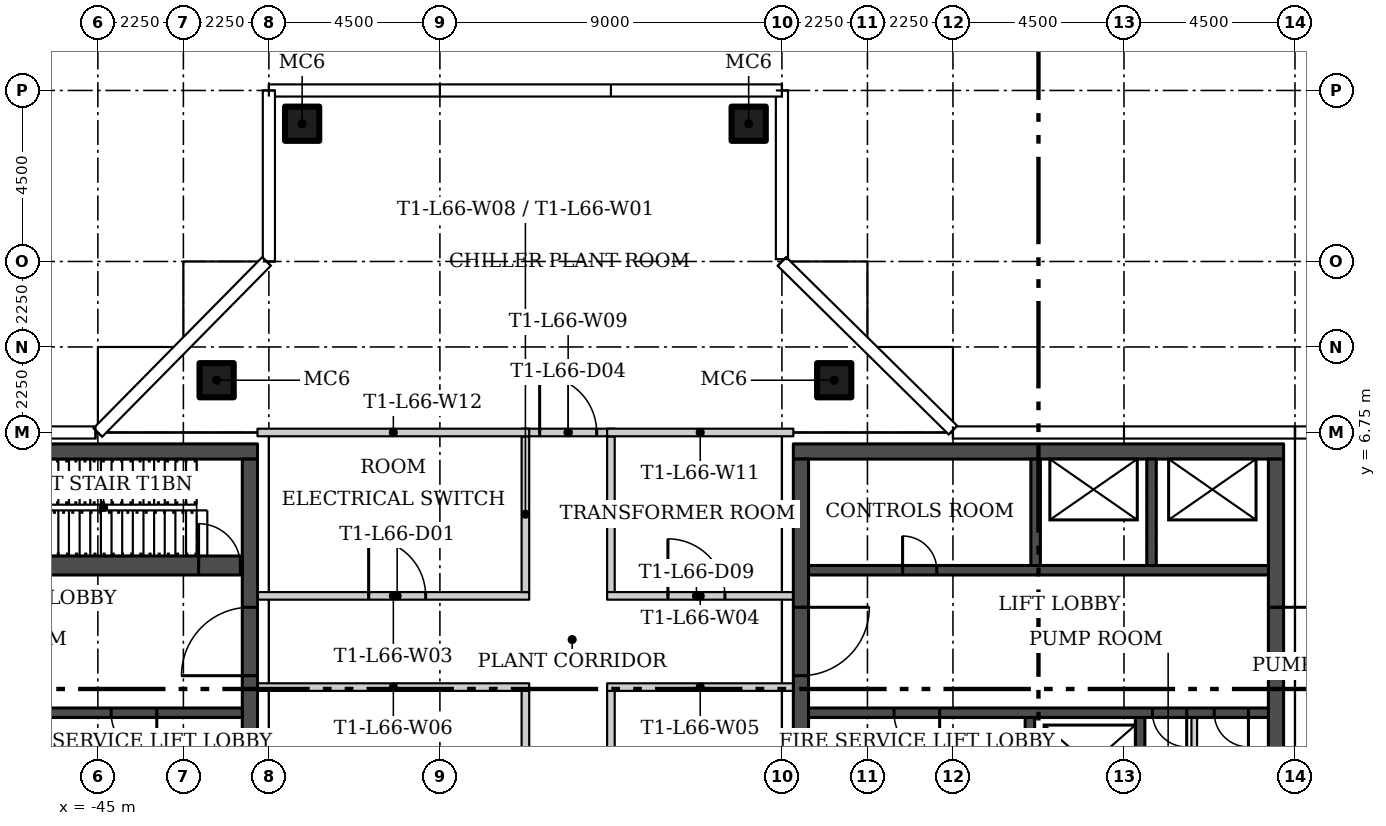
"""IFC4 building model, lengths in metres.
Left out: names, types, materials, properties, quantities, classifications, styles, units other than length and angle.
Written with IfcOpenShell. Run it as: python <this file> out.ifc"""

import sys

from ifc_helpers import new_model, si_unit, direction, frame, frame_2d, origin, origin_2d, place, context, subcontext, project, spatial, rectangle, hollow_rectangle, extrude, element, fill, save


model = new_model("IFC4")
c1 = context("Model", 3, precision=1e-05, world=origin(), true_north=direction((0.0, 1.0)))
c2 = subcontext(c1, "Body", "Model", "MODEL_VIEW")
j1 = project(units=[si_unit("LENGTHUNIT", "METRE"), si_unit("PLANEANGLEUNIT", "RADIAN")], contexts=[c1])
p1 = place(None, origin())
s1 = spatial("IfcSite", under=j1, at=p1, CompositionType="ELEMENT")
p2 = place(p1, origin())
s2 = spatial("IfcBuilding", under=s1, at=p2, CompositionType="ELEMENT")
p3 = place(p2, frame((0.0, 0.0, 273.3)))
s3 = spatial("IfcBuildingStorey", under=s2, at=p3, CompositionType="ELEMENT", Elevation=273.3)
for number, where in (
    (1, (-25.625, 8.125, 0.0)),
    (2, (-41.875, 8.125, 0.0)),
    (3, (-39.625, 14.875, 0.0)),
    (4, (-27.875, 14.875, 0.0)),
):
    element("IfcColumn", number, at=place(p3, frame(where)), inside=s3, PredefinedType="COLUMN", context=c2, shape_type="SweptSolid", body=[
        extrude(hollow_rectangle(XDim=0.9, YDim=0.9, WallThickness=0.036, at=origin_2d()), origin(), (0.0, 0.0, 1.0), 4.55),
    ])
p4 = place(p3, frame((-31.5, 6.65, 0.0), z_axis=(0.0, 0.0, 1.0), x_axis=(0.0, -1.0, 0.0)))
e5 = element("IfcWall", 5, at=p4, inside=s3, PredefinedType="PARTITIONING", context=c2, shape_type="SweptSolid", body=[
    extrude(rectangle(XDim=4.1, YDim=0.2, at=frame_2d((2.05, 0.0))), origin(), (0.0, 0.0, 1.0), 4.55),
])
p5 = place(p3, frame((-31.5, -0.05, 0.0), z_axis=(0.0, 0.0, 1.0), x_axis=(0.0, -1.0, 0.0)))
e6 = element("IfcWall", 6, at=p5, inside=s3, PredefinedType="PARTITIONING", context=c2, shape_type="SweptSolid", body=[
    extrude(rectangle(XDim=15.6, YDim=0.2, at=frame_2d((7.8, 0.0))), origin(), (0.0, 0.0, 1.0), 4.55),
])
p6 = place(p5, frame((2.55, 0.0, 0.0)))
e7 = element("IfcOpeningElement", 7, at=p6, cuts=e6, PredefinedType="OPENING", context=c2, shape_type="SweptSolid", body=[
    extrude(rectangle(XDim=1.5, YDim=2.4, at=frame_2d((0.75, 1.2))), frame((0.0, 0.11, 0.0), z_axis=(0.0, -1.0, 0.0), x_axis=(1.0, 0.0, 0.0)), (0.0, 0.0, 1.0), 0.22),
])
p7 = place(p5, frame((8.2, 0.0, 0.0)))
e8 = element("IfcOpeningElement", 8, at=p7, cuts=e6, PredefinedType="OPENING", context=c2, shape_type="SweptSolid", body=[
    extrude(rectangle(XDim=1.5, YDim=2.4, at=frame_2d((0.75, 1.2))), frame((0.0, 0.11, 0.0), z_axis=(0.0, -1.0, 0.0), x_axis=(1.0, 0.0, 0.0)), (0.0, 0.0, 1.0), 0.22),
])
p8 = place(p5, frame((12.7, 0.0, 0.0)))
e9 = element("IfcOpeningElement", 9, at=p8, cuts=e6, PredefinedType="OPENING", context=c2, shape_type="SweptSolid", body=[
    extrude(rectangle(XDim=1.5, YDim=2.4, at=frame_2d((0.75, 1.2))), frame((0.0, 0.11, 0.0), z_axis=(0.0, -1.0, 0.0), x_axis=(1.0, 0.0, 0.0)), (0.0, 0.0, 1.0), 0.22),
])
p9 = place(p3, frame((-40.8, 2.45, 0.0)))
e10 = element("IfcWall", 10, at=p9, inside=s3, PredefinedType="PARTITIONING", context=c2, shape_type="SweptSolid", body=[
    extrude(rectangle(XDim=7.15, YDim=0.2, at=frame_2d((3.575, 0.0))), origin(), (0.0, 0.0, 1.0), 4.55),
])
p10 = place(p9, frame((2.925, 0.0, 0.0)))
e11 = element("IfcOpeningElement", 11, at=p10, cuts=e10, PredefinedType="OPENING", context=c2, shape_type="SweptSolid", body=[
    extrude(rectangle(XDim=1.5, YDim=2.4, at=frame_2d((0.75, 1.2))), frame((0.0, 0.11, 0.0), z_axis=(0.0, -1.0, 0.0), x_axis=(1.0, 0.0, 0.0)), (0.0, 0.0, 1.0), 0.22),
])
p11 = place(p3, frame((-31.6, 2.45, 0.0)))
e12 = element("IfcWall", 12, at=p11, inside=s3, PredefinedType="PARTITIONING", context=c2, shape_type="SweptSolid", body=[
    extrude(rectangle(XDim=4.9, YDim=0.2, at=frame_2d((2.45, 0.0))), origin(), (0.0, 0.0, 1.0), 4.55),
])
p12 = place(p11, frame((1.6, 0.0, 0.0)))
e13 = element("IfcOpeningElement", 13, at=p12, cuts=e12, PredefinedType="OPENING", context=c2, shape_type="SweptSolid", body=[
    extrude(rectangle(XDim=1.5, YDim=2.4, at=frame_2d((0.75, 1.2))), frame((0.0, 0.11, 0.0), z_axis=(0.0, -1.0, 0.0), x_axis=(1.0, 0.0, 0.0)), (0.0, 0.0, 1.0), 0.22),
])
p13 = place(p3, frame((-26.7, 0.05, 0.0), z_axis=(0.0, 0.0, 1.0), x_axis=(-1.0, 0.0, 0.0)))
e14 = element("IfcWall", 14, at=p13, inside=s3, PredefinedType="PARTITIONING", context=c2, shape_type="SweptSolid", body=[
    extrude(rectangle(XDim=4.9, YDim=0.2, at=frame_2d((2.45, 0.0))), origin(), (0.0, 0.0, 1.0), 4.55),
])
p14 = place(p3, frame((-33.65, 0.05, 0.0), z_axis=(0.0, 0.0, 1.0), x_axis=(-1.0, 0.0, 0.0)))
e15 = element("IfcWall", 15, at=p14, inside=s3, PredefinedType="PARTITIONING", context=c2, shape_type="SweptSolid", body=[
    extrude(rectangle(XDim=7.15, YDim=0.2, at=frame_2d((3.575, 0.0))), origin(), (0.0, 0.0, 1.0), 4.55),
])
p15 = place(p3, frame((-33.75, -15.65, 0.0), z_axis=(0.0, 0.0, 1.0), x_axis=(0.0, 1.0, 0.0)))
e16 = element("IfcWall", 16, at=p15, inside=s3, PredefinedType="PARTITIONING", context=c2, shape_type="SweptSolid", body=[
    extrude(rectangle(XDim=15.6, YDim=0.2, at=frame_2d((7.8, 0.0))), origin(), (0.0, 0.0, 1.0), 4.55),
])
p16 = place(p15, frame((3.65, 0.0, 0.0)))
e17 = element("IfcOpeningElement", 17, at=p16, cuts=e16, PredefinedType="OPENING", context=c2, shape_type="SweptSolid", body=[
    extrude(rectangle(XDim=1.5, YDim=2.4, at=frame_2d((0.75, 1.2))), frame((0.0, 0.11, 0.0), z_axis=(0.0, -1.0, 0.0), x_axis=(1.0, 0.0, 0.0)), (0.0, 0.0, 1.0), 0.22),
])
p17 = place(p15, frame((11.55, 0.0, 0.0)))
e18 = element("IfcOpeningElement", 18, at=p17, cuts=e16, PredefinedType="OPENING", context=c2, shape_type="SweptSolid", body=[
    extrude(rectangle(XDim=1.5, YDim=2.4, at=frame_2d((0.75, 1.2))), frame((0.0, 0.11, 0.0), z_axis=(0.0, -1.0, 0.0), x_axis=(1.0, 0.0, 0.0)), (0.0, 0.0, 1.0), 0.22),
])
p18 = place(p3, frame((-33.75, 2.55, 0.0), z_axis=(0.0, 0.0, 1.0), x_axis=(0.0, 1.0, 0.0)))
e19 = element("IfcWall", 19, at=p18, inside=s3, PredefinedType="PARTITIONING", context=c2, shape_type="SweptSolid", body=[
    extrude(rectangle(XDim=4.1, YDim=0.2, at=frame_2d((2.05, 0.0))), origin(), (0.0, 0.0, 1.0), 4.55),
])
p19 = place(p3, frame((-33.85, 6.75, 0.0)))
e20 = element("IfcWall", 20, at=p19, inside=s3, PredefinedType="PARTITIONING", context=c2, shape_type="SweptSolid", body=[
    extrude(rectangle(XDim=2.45, YDim=0.2, at=frame_2d((1.225, 0.0))), origin(), (0.0, 0.0, 1.0), 4.55),
])
p20 = place(p19, frame((0.475, 0.0, 0.0)))
e21 = element("IfcOpeningElement", 21, at=p20, cuts=e20, PredefinedType="OPENING", context=c2, shape_type="SweptSolid", body=[
    extrude(rectangle(XDim=1.5, YDim=2.4, at=frame_2d((0.75, 1.2))), frame((0.0, 0.11, 0.0), z_axis=(0.0, -1.0, 0.0), x_axis=(1.0, 0.0, 0.0)), (0.0, 0.0, 1.0), 0.22),
])
p21 = place(p3, frame((-26.7, 6.75, 0.0), z_axis=(0.0, 0.0, 1.0), x_axis=(-1.0, 0.0, 0.0)))
e22 = element("IfcWall", 22, at=p21, inside=s3, PredefinedType="PARTITIONING", context=c2, shape_type="SweptSolid", body=[
    extrude(rectangle(XDim=4.9, YDim=0.2, at=frame_2d((2.45, 0.0))), origin(), (0.0, 0.0, 1.0), 4.55),
])
p22 = place(p3, frame((-33.65, 6.75, 0.0), z_axis=(0.0, 0.0, 1.0), x_axis=(-1.0, 0.0, 0.0)))
e23 = element("IfcWall", 23, at=p22, inside=s3, PredefinedType="PARTITIONING", context=c2, shape_type="SweptSolid", body=[
    extrude(rectangle(XDim=7.15, YDim=0.2, at=frame_2d((3.575, 0.0))), origin(), (0.0, 0.0, 1.0), 4.55),
])
p23 = place(p3, frame((-26.7, 6.25, 0.0)))
e24 = element("IfcWall", 24, at=p23, inside=s3, PredefinedType="SHEAR", context=c2, shape_type="SweptSolid", body=[
    extrude(rectangle(XDim=12.9, YDim=0.4, at=frame_2d((6.45, 0.0))), origin(), (0.0, 0.0, 1.0), 4.55),
])
p24 = place(p3, frame((-26.5, 6.05, 0.0), z_axis=(0.0, 0.0, 1.0), x_axis=(0.0, -1.0, 0.0)))
e25 = element("IfcWall", 25, at=p24, inside=s3, PredefinedType="SHEAR", context=c2, shape_type="SweptSolid", body=[
    extrude(rectangle(XDim=12.1, YDim=0.4, at=frame_2d((6.05, 0.0))), origin(), (0.0, 0.0, 1.0), 4.55),
])
p25 = place(p24, frame((3.9, 0.0, 0.0)))
e26 = element("IfcOpeningElement", 26, at=p25, cuts=e25, PredefinedType="OPENING", context=c2, shape_type="SweptSolid", body=[
    extrude(rectangle(XDim=1.8, YDim=2.4, at=frame_2d((0.9, 1.2))), frame((0.0, 0.21, 0.0), z_axis=(0.0, -1.0, 0.0), x_axis=(1.0, 0.0, 0.0)), (0.0, 0.0, 1.0), 0.42),
])
p26 = place(p3, frame((-14.0, 6.05, 0.0), z_axis=(0.0, 0.0, 1.0), x_axis=(0.0, -1.0, 0.0)))
e27 = element("IfcWall", 27, at=p26, inside=s3, PredefinedType="SHEAR", context=c2, shape_type="SweptSolid", body=[
    extrude(rectangle(XDim=12.1, YDim=0.4, at=frame_2d((6.05, 0.0))), origin(), (0.0, 0.0, 1.0), 4.55),
])
p27 = place(p26, frame((10.1, 0.0, 0.0)))
e28 = element("IfcOpeningElement", 28, at=p27, cuts=e27, PredefinedType="OPENING", context=c2, shape_type="SweptSolid", body=[
    extrude(rectangle(XDim=1.2, YDim=2.1, at=frame_2d((0.6, 1.05))), frame((0.0, 0.21, 0.0), z_axis=(0.0, -1.0, 0.0), x_axis=(1.0, 0.0, 0.0)), (0.0, 0.0, 1.0), 0.42),
])
p28 = place(p26, frame((3.9, 0.0, 0.0)))
e29 = element("IfcOpeningElement", 29, at=p28, cuts=e27, PredefinedType="OPENING", context=c2, shape_type="SweptSolid", body=[
    extrude(rectangle(XDim=1.8, YDim=2.4, at=frame_2d((0.9, 1.2))), frame((0.0, 0.21, 0.0), z_axis=(0.0, -1.0, 0.0), x_axis=(1.0, 0.0, 0.0)), (0.0, 0.0, 1.0), 0.42),
])
p29 = place(p3, frame((-14.2, -0.625, 0.0), z_axis=(0.0, 0.0, 1.0), x_axis=(-1.0, 0.0, 0.0)))
e30 = element("IfcWall", 30, at=p29, inside=s3, PredefinedType="SHEAR", context=c2, shape_type="SweptSolid", body=[
    extrude(rectangle(XDim=12.1, YDim=0.25, at=frame_2d((6.05, 0.0))), origin(), (0.0, 0.0, 1.0), 4.55),
])
p30 = place(p29, frame((8.65, 0.0, 0.0)))
e31 = element("IfcOpeningElement", 31, at=p30, cuts=e30, PredefinedType="OPENING", context=c2, shape_type="SweptSolid", body=[
    extrude(rectangle(XDim=1.2, YDim=2.1, at=frame_2d((0.6, 1.05))), frame((0.0, 0.135, 0.0), z_axis=(0.0, -1.0, 0.0), x_axis=(1.0, 0.0, 0.0)), (0.0, 0.0, 1.0), 0.27),
])
p31 = place(p29, frame((2.15, 0.0, 0.0)))
e32 = element("IfcOpeningElement", 32, at=p31, cuts=e30, PredefinedType="OPENING", context=c2, shape_type="SweptSolid", body=[
    extrude(rectangle(XDim=0.9, YDim=2.1, at=frame_2d((0.45, 1.05))), frame((0.0, 0.135, 0.0), z_axis=(0.0, -1.0, 0.0), x_axis=(1.0, 0.0, 0.0)), (0.0, 0.0, 1.0), 0.27),
])
p32 = place(p29, frame((0.525, 0.0, 0.0)))
e33 = element("IfcOpeningElement", 33, at=p32, cuts=e30, PredefinedType="OPENING", context=c2, shape_type="SweptSolid", body=[
    extrude(rectangle(XDim=0.9, YDim=2.1, at=frame_2d((0.45, 1.05))), frame((0.0, 0.135, 0.0), z_axis=(0.0, -1.0, 0.0), x_axis=(1.0, 0.0, 0.0)), (0.0, 0.0, 1.0), 0.27),
])
p33 = place(p3, frame((-20.475, -3.25, 0.0), z_axis=(0.0, 0.0, 1.0), x_axis=(0.0, 1.0, 0.0)))
e34 = element("IfcWall", 34, at=p33, inside=s3, PredefinedType="SHEAR", context=c2, shape_type="SweptSolid", body=[
    extrude(rectangle(XDim=2.5, YDim=0.25, at=frame_2d((1.25, 0.0))), origin(), (0.0, 0.0, 1.0), 4.55),
])
p34 = place(p33, frame((0.7, 0.0, 0.0)))
e35 = element("IfcOpeningElement", 35, at=p34, cuts=e34, PredefinedType="OPENING", context=c2, shape_type="SweptSolid", body=[
    extrude(rectangle(XDim=1.1, YDim=2.1, at=frame_2d((0.55, 1.05))), frame((0.0, 0.135, 0.0), z_axis=(0.0, -1.0, 0.0), x_axis=(1.0, 0.0, 0.0)), (0.0, 0.0, 1.0), 0.27),
])
p35 = place(p3, frame((-17.575, -3.25, 0.0), z_axis=(0.0, 0.0, 1.0), x_axis=(0.0, 1.0, 0.0)))
e36 = element("IfcWall", 36, at=p35, inside=s3, PredefinedType="SHEAR", context=c2, shape_type="SweptSolid", body=[
    extrude(rectangle(XDim=2.5, YDim=0.25, at=frame_2d((1.25, 0.0))), origin(), (0.0, 0.0, 1.0), 4.55),
])
p36 = place(p3, frame((-16.15, -3.25, 0.0), z_axis=(0.0, 0.0, 1.0), x_axis=(0.0, 1.0, 0.0)))
e37 = element("IfcWall", 37, at=p36, inside=s3, PredefinedType="PARTITIONING", context=c2, shape_type="SweptSolid", body=[
    extrude(rectangle(XDim=2.5, YDim=0.15, at=frame_2d((1.25, 0.0))), origin(), (0.0, 0.0, 1.0), 4.55),
])
p37 = place(p3, frame((-26.3, 3.125, 0.0)))
e38 = element("IfcWall", 38, at=p37, inside=s3, PredefinedType="SHEAR", context=c2, shape_type="SweptSolid", body=[
    extrude(rectangle(XDim=12.1, YDim=0.25, at=frame_2d((6.05, 0.0))), origin(), (0.0, 0.0, 1.0), 4.55),
])
p38 = place(p37, frame((2.475, 0.0, 0.0)))
e39 = element("IfcOpeningElement", 39, at=p38, cuts=e38, PredefinedType="OPENING", context=c2, shape_type="SweptSolid", body=[
    extrude(rectangle(XDim=0.9, YDim=2.1, at=frame_2d((0.45, 1.05))), frame((0.0, 0.135, 0.0), z_axis=(0.0, -1.0, 0.0), x_axis=(1.0, 0.0, 0.0)), (0.0, 0.0, 1.0), 0.27),
])
for number, where, z_axis, x_axis in (
    (40, (-20.325, 3.25, 0.0), (0.0, 0.0, 1.0), (0.0, 1.0, 0.0)),
    (41, (-17.275, 3.25, 0.0), (0.0, 0.0, 1.0), (0.0, 1.0, 0.0)),
):
    element("IfcWall", number, at=place(p3, frame(where, z_axis=z_axis, x_axis=x_axis)), inside=s3, PredefinedType="SHEAR", context=c2, shape_type="SweptSolid", body=[
        extrude(rectangle(XDim=2.8, YDim=0.25, at=frame_2d((1.4, 0.0))), origin(), (0.0, 0.0, 1.0), 4.55),
    ])
p39 = place(p3, frame((-40.8, 6.25, 0.0), z_axis=(0.0, 0.0, 1.0), x_axis=(-1.0, 0.0, 0.0)))
e42 = element("IfcWall", 42, at=p39, inside=s3, PredefinedType="SHEAR", context=c2, shape_type="SweptSolid", body=[
    extrude(rectangle(XDim=12.9, YDim=0.4, at=frame_2d((6.45, 0.0))), origin(), (0.0, 0.0, 1.0), 4.55),
])
p40 = place(p3, frame((-41.0, -6.05, 0.0), z_axis=(0.0, 0.0, 1.0), x_axis=(0.0, 1.0, 0.0)))
e43 = element("IfcWall", 43, at=p40, inside=s3, PredefinedType="SHEAR", context=c2, shape_type="SweptSolid", body=[
    extrude(rectangle(XDim=12.1, YDim=0.4, at=frame_2d((6.05, 0.0))), origin(), (0.0, 0.0, 1.0), 4.55),
])
p41 = place(p40, frame((6.4, 0.0, 0.0)))
e44 = element("IfcOpeningElement", 44, at=p41, cuts=e43, PredefinedType="OPENING", context=c2, shape_type="SweptSolid", body=[
    extrude(rectangle(XDim=1.8, YDim=2.4, at=frame_2d((0.9, 1.2))), frame((0.0, 0.21, 0.0), z_axis=(0.0, -1.0, 0.0), x_axis=(1.0, 0.0, 0.0)), (0.0, 0.0, 1.0), 0.42),
])
p42 = place(p3, frame((-41.2, -0.625, 0.0), z_axis=(0.0, 0.0, 1.0), x_axis=(-1.0, 0.0, 0.0)))
e45 = element("IfcWall", 45, at=p42, inside=s3, PredefinedType="SHEAR", context=c2, shape_type="SweptSolid", body=[
    extrude(rectangle(XDim=12.1, YDim=0.25, at=frame_2d((6.05, 0.0))), origin(), (0.0, 0.0, 1.0), 4.55),
])
p43 = place(p42, frame((2.25, 0.0, 0.0)))
e46 = element("IfcOpeningElement", 46, at=p43, cuts=e45, PredefinedType="OPENING", context=c2, shape_type="SweptSolid", body=[
    extrude(rectangle(XDim=1.2, YDim=2.1, at=frame_2d((0.6, 1.05))), frame((0.0, 0.135, 0.0), z_axis=(0.0, -1.0, 0.0), x_axis=(1.0, 0.0, 0.0)), (0.0, 0.0, 1.0), 0.27),
])
p44 = place(p42, frame((9.2, 0.0, 0.0)))
e47 = element("IfcOpeningElement", 47, at=p44, cuts=e45, PredefinedType="OPENING", context=c2, shape_type="SweptSolid", body=[
    extrude(rectangle(XDim=0.9, YDim=2.1, at=frame_2d((0.45, 1.05))), frame((0.0, 0.135, 0.0), z_axis=(0.0, -1.0, 0.0), x_axis=(1.0, 0.0, 0.0)), (0.0, 0.0, 1.0), 0.27),
])
p45 = place(p42, frame((10.825, 0.0, 0.0)))
e48 = element("IfcOpeningElement", 48, at=p45, cuts=e45, PredefinedType="OPENING", context=c2, shape_type="SweptSolid", body=[
    extrude(rectangle(XDim=0.9, YDim=2.1, at=frame_2d((0.45, 1.05))), frame((0.0, 0.135, 0.0), z_axis=(0.0, -1.0, 0.0), x_axis=(1.0, 0.0, 0.0)), (0.0, 0.0, 1.0), 0.27),
])
p46 = place(p3, frame((-48.5, 3.25, 0.0)))
e49 = element("IfcWall", 49, at=p46, inside=s3, PredefinedType="SHEAR", context=c2, shape_type="SweptSolid", body=[
    extrude(rectangle(XDim=7.3, YDim=0.5, at=frame_2d((3.65, 0.0))), origin(), (0.0, 0.0, 1.0), 4.55),
])
p47 = place(p46, frame((6.15, 0.0, 0.0)))
e50 = element("IfcOpeningElement", 50, at=p47, cuts=e49, PredefinedType="OPENING", context=c2, shape_type="SweptSolid", body=[
    extrude(rectangle(XDim=1.1, YDim=2.1, at=frame_2d((0.55, 1.05))), frame((0.0, 0.26, 0.0), z_axis=(0.0, -1.0, 0.0), x_axis=(1.0, 0.0, 0.0)), (0.0, 0.0, 1.0), 0.52),
])
p48 = place(p10, origin())
e51 = element("IfcDoor", 51, at=p48, inside=s3, OperationType="DOUBLE_DOOR_SINGLE_SWING", PredefinedType="DOOR", context=c2, shape_type="SweptSolid", body=[
    extrude(rectangle(XDim=1.5, YDim=2.4, at=frame_2d((0.75, 1.2))), frame((0.0, 0.025, 0.0), z_axis=(0.0, -1.0, 0.0), x_axis=(1.0, 0.0, 0.0)), (0.0, 0.0, 1.0), 0.05),
])
fill(e11, e51)
p49 = place(p20, origin())
e52 = element("IfcDoor", 52, at=p49, inside=s3, OperationType="DOUBLE_DOOR_SINGLE_SWING", PredefinedType="DOOR", context=c2, shape_type="SweptSolid", body=[
    extrude(rectangle(XDim=1.5, YDim=2.4, at=frame_2d((0.75, 1.2))), frame((0.0, 0.025, 0.0), z_axis=(0.0, -1.0, 0.0), x_axis=(1.0, 0.0, 0.0)), (0.0, 0.0, 1.0), 0.05),
])
fill(e21, e52)
p50 = place(p12, origin())
e53 = element("IfcDoor", 53, at=p50, inside=s3, OperationType="DOUBLE_DOOR_SINGLE_SWING", PredefinedType="DOOR", context=c2, shape_type="SweptSolid", body=[
    extrude(rectangle(XDim=1.5, YDim=2.4, at=frame_2d((0.75, 1.2))), frame((0.0, 0.025, 0.0), z_axis=(0.0, -1.0, 0.0), x_axis=(1.0, 0.0, 0.0)), (0.0, 0.0, 1.0), 0.05),
])
fill(e13, e53)
p51 = place(p25, origin())
e54 = element("IfcDoor", 54, at=p51, inside=s3, OperationType="DOUBLE_DOOR_SINGLE_SWING", PredefinedType="DOOR", context=c2, shape_type="SweptSolid", body=[
    extrude(rectangle(XDim=1.8, YDim=2.4, at=frame_2d((0.9, 1.2))), frame((0.0, 0.025, 0.0), z_axis=(0.0, -1.0, 0.0), x_axis=(1.0, 0.0, 0.0)), (0.0, 0.0, 1.0), 0.05),
])
fill(e26, e54)
p52 = place(p28, origin())
e55 = element("IfcDoor", 55, at=p52, inside=s3, OperationType="DOUBLE_DOOR_SINGLE_SWING", PredefinedType="DOOR", context=c2, shape_type="SweptSolid", body=[
    extrude(rectangle(XDim=1.8, YDim=2.4, at=frame_2d((0.9, 1.2))), frame((0.0, 0.025, 0.0), z_axis=(0.0, -1.0, 0.0), x_axis=(1.0, 0.0, 0.0)), (0.0, 0.0, 1.0), 0.05),
])
fill(e29, e55)
p53 = place(p30, origin())
e56 = element("IfcDoor", 56, at=p53, inside=s3, OperationType="SINGLE_SWING_RIGHT", PredefinedType="DOOR", context=c2, shape_type="SweptSolid", body=[
    extrude(rectangle(XDim=1.2, YDim=2.1, at=frame_2d((0.6, 1.05))), frame((0.0, 0.025, 0.0), z_axis=(0.0, -1.0, 0.0), x_axis=(1.0, 0.0, 0.0)), (0.0, 0.0, 1.0), 0.05),
])
fill(e31, e56)
p54 = place(p31, origin())
e57 = element("IfcDoor", 57, at=p54, inside=s3, OperationType="SINGLE_SWING_LEFT", PredefinedType="DOOR", context=c2, shape_type="SweptSolid", body=[
    extrude(rectangle(XDim=0.9, YDim=2.1, at=frame_2d((0.45, 1.05))), frame((0.0, 0.025, 0.0), z_axis=(0.0, -1.0, 0.0), x_axis=(1.0, 0.0, 0.0)), (0.0, 0.0, 1.0), 0.05),
])
fill(e32, e57)
p55 = place(p32, origin())
e58 = element("IfcDoor", 58, at=p55, inside=s3, OperationType="SINGLE_SWING_LEFT", PredefinedType="DOOR", context=c2, shape_type="SweptSolid", body=[
    extrude(rectangle(XDim=0.9, YDim=2.1, at=frame_2d((0.45, 1.05))), frame((0.0, 0.025, 0.0), z_axis=(0.0, -1.0, 0.0), x_axis=(1.0, 0.0, 0.0)), (0.0, 0.0, 1.0), 0.05),
])
fill(e33, e58)
p56 = place(p34, origin())
e59 = element("IfcDoor", 59, at=p56, inside=s3, OperationType="SLIDING_TO_LEFT", PredefinedType="DOOR", context=c2, shape_type="SweptSolid", body=[
    extrude(rectangle(XDim=1.1, YDim=2.1, at=frame_2d((0.55, 1.05))), frame((0.0, 0.025, 0.0), z_axis=(0.0, -1.0, 0.0), x_axis=(1.0, 0.0, 0.0)), (0.0, 0.0, 1.0), 0.05),
])
fill(e35, e59)
p57 = place(p38, origin())
e60 = element("IfcDoor", 60, at=p57, inside=s3, OperationType="SINGLE_SWING_LEFT", PredefinedType="DOOR", context=c2, shape_type="SweptSolid", body=[
    extrude(rectangle(XDim=0.9, YDim=2.1, at=frame_2d((0.45, 1.05))), frame((0.0, 0.025, 0.0), z_axis=(0.0, -1.0, 0.0), x_axis=(1.0, 0.0, 0.0)), (0.0, 0.0, 1.0), 0.05),
])
fill(e39, e60)
p58 = place(p41, origin())
e61 = element("IfcDoor", 61, at=p58, inside=s3, OperationType="DOUBLE_DOOR_SINGLE_SWING", PredefinedType="DOOR", context=c2, shape_type="SweptSolid", body=[
    extrude(rectangle(XDim=1.8, YDim=2.4, at=frame_2d((0.9, 1.2))), frame((0.0, 0.025, 0.0), z_axis=(0.0, -1.0, 0.0), x_axis=(1.0, 0.0, 0.0)), (0.0, 0.0, 1.0), 0.05),
])
fill(e44, e61)
p59 = place(p43, origin())
e62 = element("IfcDoor", 62, at=p59, inside=s3, OperationType="SINGLE_SWING_LEFT", PredefinedType="DOOR", context=c2, shape_type="SweptSolid", body=[
    extrude(rectangle(XDim=1.2, YDim=2.1, at=frame_2d((0.6, 1.05))), frame((0.0, 0.025, 0.0), z_axis=(0.0, -1.0, 0.0), x_axis=(1.0, 0.0, 0.0)), (0.0, 0.0, 1.0), 0.05),
])
fill(e46, e62)
p60 = place(p47, origin())
e63 = element("IfcDoor", 63, at=p60, inside=s3, OperationType="SINGLE_SWING_RIGHT", PredefinedType="DOOR", context=c2, shape_type="SweptSolid", body=[
    extrude(rectangle(XDim=1.1, YDim=2.1, at=frame_2d((0.55, 1.05))), frame((0.0, 0.025, 0.0), z_axis=(0.0, -1.0, 0.0), x_axis=(1.0, 0.0, 0.0)), (0.0, 0.0, 1.0), 0.05),
])
fill(e50, e63)
save(model, sys.argv[1])
